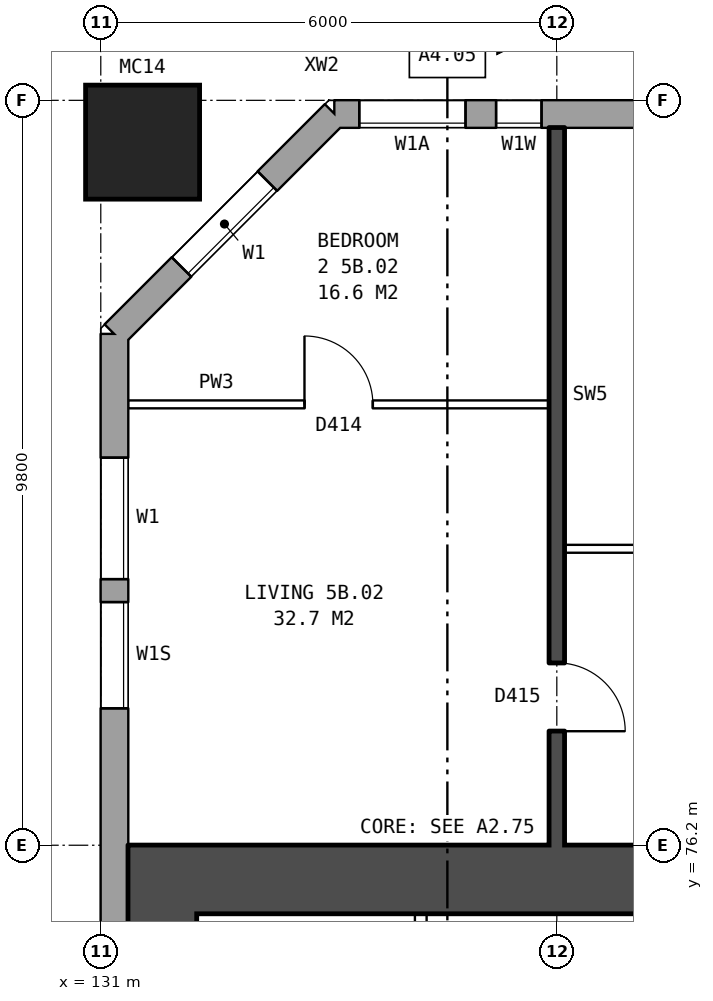
"""IFC4 building model, lengths in metres.
Left out: names, types, materials, properties, quantities, classifications, styles, units other than length and angle.
Written with IfcOpenShell. Run it as: python <this file> out.ifc"""

import sys

from ifc_helpers import new_model, si_unit, direction, frame, frame_2d, origin, origin_2d, place, context, subcontext, project, spatial, rectangle, hollow_rectangle, extrude, element, fill, save


model = new_model("IFC4")
c1 = context("Model", 3, precision=1e-05, world=origin(), true_north=direction((0.0, 1.0)))
c2 = subcontext(c1, "Body", "Model", "MODEL_VIEW")
j1 = project(units=[si_unit("LENGTHUNIT", "METRE"), si_unit("PLANEANGLEUNIT", "RADIAN")], contexts=[c1])
p1 = place(None, origin())
s1 = spatial("IfcSite", under=j1, at=p1, CompositionType="ELEMENT")
p2 = place(p1, origin())
s2 = spatial("IfcBuilding", under=s1, at=p2, CompositionType="ELEMENT")
p3 = place(p2, frame((0.0, 0.0, 22.6)))
s3 = spatial("IfcBuildingStorey", under=s2, at=p3, CompositionType="ELEMENT", Elevation=22.6)
p4 = place(p3, frame((131.55, 85.45, 0.0), z_axis=(0.0, 0.0, 1.0), x_axis=(1.0, 0.0, 0.0)))
e1 = element("IfcColumn", 1, at=p4, inside=s3, PredefinedType="COLUMN", context=c2, shape_type="SweptSolid", body=[
    extrude(hollow_rectangle(XDim=1.5, YDim=1.5, WallThickness=0.08, at=origin_2d()), origin(), (0.0, 0.0, 1.0), 3.1),
])
p5 = place(p3, frame((174.675, 85.82, 0.0), z_axis=(0.0, 0.0, 1.0), x_axis=(-1.0, 0.0, 0.0)))
e2 = element("IfcWall", 2, at=p5, inside=s3, PredefinedType="STANDARD", context=c2, shape_type="SweptSolid", body=[
    extrude(rectangle(XDim=40.601, YDim=0.36, at=frame_2d((20.3, 0.0))), origin(), (0.0, 0.0, 1.0), 2.85),
])
p6 = place(p5, frame((1.875, 0.0, 1.7)))
e3 = element("IfcOpeningElement", 3, at=p6, cuts=e2, PredefinedType="OPENING", context=c2, shape_type="SweptSolid", body=[
    extrude(rectangle(XDim=1.0, YDim=0.9, at=frame_2d((0.5, 0.45))), frame((0.0, 0.19, 0.0), z_axis=(0.0, -1.0, 0.0), x_axis=(1.0, 0.0, 0.0)), (0.0, 0.0, 1.0), 0.38),
])
p7 = place(p5, frame((5.375, 0.0, 0.8)))
e4 = element("IfcOpeningElement", 4, at=p7, cuts=e2, PredefinedType="OPENING", context=c2, shape_type="SweptSolid", body=[
    extrude(rectangle(XDim=1.6, YDim=1.8, at=frame_2d((0.8, 0.9))), frame((0.0, 0.19, 0.0), z_axis=(0.0, -1.0, 0.0), x_axis=(1.0, 0.0, 0.0)), (0.0, 0.0, 1.0), 0.38),
])
p8 = place(p5, frame((8.375, 0.0, 0.8)))
e5 = element("IfcOpeningElement", 5, at=p8, cuts=e2, PredefinedType="OPENING", context=c2, shape_type="SweptSolid", body=[
    extrude(rectangle(XDim=1.6, YDim=1.8, at=frame_2d((0.8, 0.9))), frame((0.0, 0.19, 0.0), z_axis=(0.0, -1.0, 0.0), x_axis=(1.0, 0.0, 0.0)), (0.0, 0.0, 1.0), 0.38),
])
p9 = place(p5, frame((11.375, 0.0, 0.8)))
e6 = element("IfcOpeningElement", 6, at=p9, cuts=e2, PredefinedType="OPENING", context=c2, shape_type="SweptSolid", body=[
    extrude(rectangle(XDim=1.6, YDim=1.8, at=frame_2d((0.8, 0.9))), frame((0.0, 0.19, 0.0), z_axis=(0.0, -1.0, 0.0), x_axis=(1.0, 0.0, 0.0)), (0.0, 0.0, 1.0), 0.38),
])
p10 = place(p5, frame((14.375, 0.0, 0.8)))
e7 = element("IfcOpeningElement", 7, at=p10, cuts=e2, PredefinedType="OPENING", context=c2, shape_type="SweptSolid", body=[
    extrude(rectangle(XDim=1.6, YDim=1.8, at=frame_2d((0.8, 0.9))), frame((0.0, 0.19, 0.0), z_axis=(0.0, -1.0, 0.0), x_axis=(1.0, 0.0, 0.0)), (0.0, 0.0, 1.0), 0.38),
])
p11 = place(p5, frame((17.375, 0.0, 0.8)))
e8 = element("IfcOpeningElement", 8, at=p11, cuts=e2, PredefinedType="OPENING", context=c2, shape_type="SweptSolid", body=[
    extrude(rectangle(XDim=1.6, YDim=1.8, at=frame_2d((0.8, 0.9))), frame((0.0, 0.19, 0.0), z_axis=(0.0, -1.0, 0.0), x_axis=(1.0, 0.0, 0.0)), (0.0, 0.0, 1.0), 0.38),
])
p12 = place(p5, frame((20.375, 0.0, 0.8)))
e9 = element("IfcOpeningElement", 9, at=p12, cuts=e2, PredefinedType="OPENING", context=c2, shape_type="SweptSolid", body=[
    extrude(rectangle(XDim=1.6, YDim=1.8, at=frame_2d((0.8, 0.9))), frame((0.0, 0.19, 0.0), z_axis=(0.0, -1.0, 0.0), x_axis=(1.0, 0.0, 0.0)), (0.0, 0.0, 1.0), 0.38),
])
p13 = place(p5, frame((23.375, 0.0, 0.8)))
e10 = element("IfcOpeningElement", 10, at=p13, cuts=e2, PredefinedType="OPENING", context=c2, shape_type="SweptSolid", body=[
    extrude(rectangle(XDim=1.6, YDim=1.8, at=frame_2d((0.8, 0.9))), frame((0.0, 0.19, 0.0), z_axis=(0.0, -1.0, 0.0), x_axis=(1.0, 0.0, 0.0)), (0.0, 0.0, 1.0), 0.38),
])
p14 = place(p5, frame((26.375, 0.0, 0.8)))
e11 = element("IfcOpeningElement", 11, at=p14, cuts=e2, PredefinedType="OPENING", context=c2, shape_type="SweptSolid", body=[
    extrude(rectangle(XDim=1.6, YDim=1.8, at=frame_2d((0.8, 0.9))), frame((0.0, 0.19, 0.0), z_axis=(0.0, -1.0, 0.0), x_axis=(1.0, 0.0, 0.0)), (0.0, 0.0, 1.0), 0.38),
])
p15 = place(p5, frame((29.375, 0.0, 0.8)))
e12 = element("IfcOpeningElement", 12, at=p15, cuts=e2, PredefinedType="OPENING", context=c2, shape_type="SweptSolid", body=[
    extrude(rectangle(XDim=1.6, YDim=1.8, at=frame_2d((0.8, 0.9))), frame((0.0, 0.19, 0.0), z_axis=(0.0, -1.0, 0.0), x_axis=(1.0, 0.0, 0.0)), (0.0, 0.0, 1.0), 0.38),
])
p16 = place(p5, frame((32.375, 0.0, 0.8)))
e13 = element("IfcOpeningElement", 13, at=p16, cuts=e2, PredefinedType="OPENING", context=c2, shape_type="SweptSolid", body=[
    extrude(rectangle(XDim=1.6, YDim=1.8, at=frame_2d((0.8, 0.9))), frame((0.0, 0.19, 0.0), z_axis=(0.0, -1.0, 0.0), x_axis=(1.0, 0.0, 0.0)), (0.0, 0.0, 1.0), 0.38),
])
p17 = place(p5, frame((34.275, 0.0, 0.8)))
e14 = element("IfcOpeningElement", 14, at=p17, cuts=e2, PredefinedType="OPENING", context=c2, shape_type="SweptSolid", body=[
    extrude(rectangle(XDim=1.0, YDim=1.8, at=frame_2d((0.5, 0.9))), frame((0.0, 0.19, 0.0), z_axis=(0.0, -1.0, 0.0), x_axis=(1.0, 0.0, 0.0)), (0.0, 0.0, 1.0), 0.38),
])
p18 = place(p5, frame((37.875, 0.0, 1.6)))
e15 = element("IfcOpeningElement", 15, at=p18, cuts=e2, PredefinedType="OPENING", context=c2, shape_type="SweptSolid", body=[
    extrude(rectangle(XDim=0.6, YDim=0.9, at=frame_2d((0.3, 0.45))), frame((0.0, 0.19, 0.0), z_axis=(0.0, -1.0, 0.0), x_axis=(1.0, 0.0, 0.0)), (0.0, 0.0, 1.0), 0.38),
])
p19 = place(p5, frame((4.125, 0.0, 0.8)))
e16 = element("IfcOpeningElement", 16, at=p19, cuts=e2, PredefinedType="OPENING", context=c2, shape_type="SweptSolid", body=[
    extrude(rectangle(XDim=0.8, YDim=0.9, at=frame_2d((0.4, 0.45))), frame((0.0, 0.19, 0.0), z_axis=(0.0, -1.0, 0.0), x_axis=(1.0, 0.0, 0.0)), (0.0, 0.0, 1.0), 0.38),
])
p20 = place(p5, frame((35.575, 0.0, 0.8)))
e17 = element("IfcOpeningElement", 17, at=p20, cuts=e2, PredefinedType="OPENING", context=c2, shape_type="SweptSolid", body=[
    extrude(rectangle(XDim=0.8, YDim=0.9, at=frame_2d((0.4, 0.45))), frame((0.0, 0.19, 0.0), z_axis=(0.0, -1.0, 0.0), x_axis=(1.0, 0.0, 0.0)), (0.0, 0.0, 1.0), 0.38),
])
p21 = place(p5, frame((38.875, 0.0, 0.8)))
e18 = element("IfcOpeningElement", 18, at=p21, cuts=e2, PredefinedType="OPENING", context=c2, shape_type="SweptSolid", body=[
    extrude(rectangle(XDim=1.4, YDim=1.8, at=frame_2d((0.7, 0.9))), frame((0.0, 0.19, 0.0), z_axis=(0.0, -1.0, 0.0), x_axis=(1.0, 0.0, 0.0)), (0.0, 0.0, 1.0), 0.38),
])
p22 = place(p3, frame((134.075, 85.82, 0.0), z_axis=(0.0, 0.0, 1.0), x_axis=(-0.707106781187, -0.707106781187, 0.0)))
e19 = element("IfcWall", 19, at=p22, inside=s3, PredefinedType="STANDARD", context=c2, shape_type="SweptSolid", body=[
    extrude(rectangle(XDim=4.094, YDim=0.36, at=frame_2d((2.047, 0.0))), origin(), (0.0, 0.0, 1.0), 2.85),
])
p23 = place(p22, frame((1.247, 0.0, 0.8)))
e20 = element("IfcOpeningElement", 20, at=p23, cuts=e19, PredefinedType="OPENING", context=c2, shape_type="SweptSolid", body=[
    extrude(rectangle(XDim=1.6, YDim=1.8, at=frame_2d((0.8, 0.9))), frame((0.0, 0.19, 0.0), z_axis=(0.0, -1.0, 0.0), x_axis=(1.0, 0.0, 0.0)), (0.0, 0.0, 1.0), 0.38),
])
p24 = place(p3, frame((131.18, 82.925, 0.0), z_axis=(0.0, 0.0, 1.0), x_axis=(0.0, -1.0, 0.0)))
e21 = element("IfcWall", 21, at=p24, inside=s3, PredefinedType="STANDARD", context=c2, shape_type="SweptSolid", body=[
    extrude(rectangle(XDim=25.851, YDim=0.36, at=frame_2d((12.925, 0.0))), origin(), (0.0, 0.0, 1.0), 2.85),
])
p25 = place(p24, frame((1.625, 0.0, 0.8)))
e22 = element("IfcOpeningElement", 22, at=p25, cuts=e21, PredefinedType="OPENING", context=c2, shape_type="SweptSolid", body=[
    extrude(rectangle(XDim=1.6, YDim=1.8, at=frame_2d((0.8, 0.9))), frame((0.0, 0.19, 0.0), z_axis=(0.0, -1.0, 0.0), x_axis=(1.0, 0.0, 0.0)), (0.0, 0.0, 1.0), 0.38),
])
p26 = place(p24, frame((3.525, 0.0, 1.7)))
e23 = element("IfcOpeningElement", 23, at=p26, cuts=e21, PredefinedType="OPENING", context=c2, shape_type="SweptSolid", body=[
    extrude(rectangle(XDim=1.4, YDim=0.9, at=frame_2d((0.7, 0.45))), frame((0.0, 0.19, 0.0), z_axis=(0.0, -1.0, 0.0), x_axis=(1.0, 0.0, 0.0)), (0.0, 0.0, 1.0), 0.38),
])
p27 = place(p24, frame((20.825, 0.0, 1.7)))
e24 = element("IfcOpeningElement", 24, at=p27, cuts=e21, PredefinedType="OPENING", context=c2, shape_type="SweptSolid", body=[
    extrude(rectangle(XDim=1.4, YDim=0.9, at=frame_2d((0.7, 0.45))), frame((0.0, 0.19, 0.0), z_axis=(0.0, -1.0, 0.0), x_axis=(1.0, 0.0, 0.0)), (0.0, 0.0, 1.0), 0.38),
])
p28 = place(p24, frame((22.625, 0.0, 0.8)))
e25 = element("IfcOpeningElement", 25, at=p28, cuts=e21, PredefinedType="OPENING", context=c2, shape_type="SweptSolid", body=[
    extrude(rectangle(XDim=1.6, YDim=1.8, at=frame_2d((0.8, 0.9))), frame((0.0, 0.19, 0.0), z_axis=(0.0, -1.0, 0.0), x_axis=(1.0, 0.0, 0.0)), (0.0, 0.0, 1.0), 0.38),
])
p29 = place(p3, frame((131.81, 64.7, 0.0), z_axis=(0.0, 0.0, 1.0), x_axis=(0.0, 1.0, 0.0)))
e26 = element("IfcWall", 26, at=p29, inside=s3, PredefinedType="SHEAR", context=c2, shape_type="SweptSolid", body=[
    extrude(rectangle(XDim=10.6, YDim=0.9, at=frame_2d((5.3, 0.0))), origin(), (0.0, 0.0, 1.0), 2.85),
])
p30 = place(p3, frame((139.76, 75.75, 0.0), z_axis=(0.0, 0.0, 1.0), x_axis=(-1.0, 0.0, 0.0)))
e27 = element("IfcWall", 27, at=p30, inside=s3, PredefinedType="SHEAR", context=c2, shape_type="SweptSolid", body=[
    extrude(rectangle(XDim=8.4, YDim=0.9, at=frame_2d((4.2, 0.0))), origin(), (0.0, 0.0, 1.0), 2.85),
])
p31 = place(p3, frame((135.21, 71.45, 0.0), z_axis=(0.0, 0.0, 1.0), x_axis=(0.0, 1.0, 0.0)))
e28 = element("IfcWall", 28, at=p31, inside=s3, PredefinedType="PARTITIONING", context=c2, shape_type="SweptSolid", body=[
    extrude(rectangle(XDim=3.85, YDim=0.15, at=frame_2d((1.925, 0.0))), origin(), (0.0, 0.0, 1.0), 2.85),
])
p32 = place(p31, frame((0.45, 0.0, 0.0)))
e29 = element("IfcOpeningElement", 29, at=p32, cuts=e28, PredefinedType="OPENING", context=c2, shape_type="SweptSolid", body=[
    extrude(rectangle(XDim=1.1, YDim=2.1, at=frame_2d((0.55, 1.05))), frame((0.0, 0.085, 0.0), z_axis=(0.0, -1.0, 0.0), x_axis=(1.0, 0.0, 0.0)), (0.0, 0.0, 1.0), 0.17),
])
p33 = place(p3, frame((137.1, 80.1, 0.0), z_axis=(0.0, 0.0, 1.0), x_axis=(1.0, 0.0, 0.0)))
e30 = element("IfcWall", 30, at=p33, inside=s3, PredefinedType="PARTITIONING", context=c2, shape_type="SweptSolid", body=[
    extrude(rectangle(XDim=5.8, YDim=0.1, at=frame_2d((2.9, 0.0))), origin(), (0.0, 0.0, 1.0), 2.85),
])
p34 = place(p33, frame((1.3, 0.0, 0.0)))
e31 = element("IfcOpeningElement", 31, at=p34, cuts=e30, PredefinedType="OPENING", context=c2, shape_type="SweptSolid", body=[
    extrude(rectangle(XDim=0.9, YDim=2.1, at=frame_2d((0.45, 1.05))), frame((0.0, 0.06, 0.0), z_axis=(0.0, -1.0, 0.0), x_axis=(1.0, 0.0, 0.0)), (0.0, 0.0, 1.0), 0.12),
])
p35 = place(p33, frame((4.2, 0.0, 0.0)))
e32 = element("IfcOpeningElement", 32, at=p35, cuts=e30, PredefinedType="OPENING", context=c2, shape_type="SweptSolid", body=[
    extrude(rectangle(XDim=0.9, YDim=2.1, at=frame_2d((0.45, 1.05))), frame((0.0, 0.06, 0.0), z_axis=(0.0, -1.0, 0.0), x_axis=(1.0, 0.0, 0.0)), (0.0, 0.0, 1.0), 0.12),
])
p36 = place(p3, frame((131.36, 82.0, 0.0), z_axis=(0.0, 0.0, 1.0), x_axis=(1.0, 0.0, 0.0)))
e33 = element("IfcWall", 33, at=p36, inside=s3, PredefinedType="PARTITIONING", context=c2, shape_type="SweptSolid", body=[
    extrude(rectangle(XDim=5.54, YDim=0.1, at=frame_2d((2.77, 0.0))), origin(), (0.0, 0.0, 1.0), 2.85),
])
p37 = place(p36, frame((2.32, 0.0, 0.0)))
e34 = element("IfcOpeningElement", 34, at=p37, cuts=e33, PredefinedType="OPENING", context=c2, shape_type="SweptSolid", body=[
    extrude(rectangle(XDim=0.9, YDim=2.1, at=frame_2d((0.45, 1.05))), frame((0.0, 0.06, 0.0), z_axis=(0.0, -1.0, 0.0), x_axis=(1.0, 0.0, 0.0)), (0.0, 0.0, 1.0), 0.12),
])
p38 = place(p3, frame((137.0, 76.2, 0.0), z_axis=(0.0, 0.0, 1.0), x_axis=(0.0, 1.0, 0.0)))
e35 = element("IfcWall", 35, at=p38, inside=s3, PredefinedType="SOLIDWALL", context=c2, shape_type="SweptSolid", body=[
    extrude(rectangle(XDim=9.44, YDim=0.2, at=frame_2d((4.72, 0.0))), origin(), (0.0, 0.0, 1.0), 2.85),
])
p39 = place(p38, frame((1.5, 0.0, 0.0)))
e36 = element("IfcOpeningElement", 36, at=p39, cuts=e35, PredefinedType="OPENING", context=c2, shape_type="SweptSolid", body=[
    extrude(rectangle(XDim=0.9, YDim=2.1, at=frame_2d((0.45, 1.05))), frame((0.0, 0.11, 0.0), z_axis=(0.0, -1.0, 0.0), x_axis=(1.0, 0.0, 0.0)), (0.0, 0.0, 1.0), 0.22),
])
p40 = place(p18, origin())
e37 = element("IfcWindow", 37, at=p40, inside=s3, PartitioningType="SINGLE_PANEL", PredefinedType="WINDOW", context=c2, shape_type="SweptSolid", body=[
    extrude(rectangle(XDim=0.6, YDim=0.9, at=frame_2d((0.3, 0.45))), frame((0.0, 0.15, 0.0), z_axis=(0.0, -1.0, 0.0), x_axis=(1.0, 0.0, 0.0)), (0.0, 0.0, 1.0), 0.06),
])
fill(e15, e37)
p41 = place(p23, origin())
e38 = element("IfcWindow", 38, at=p41, inside=s3, PartitioningType="SINGLE_PANEL", PredefinedType="WINDOW", context=c2, shape_type="SweptSolid", body=[
    extrude(rectangle(XDim=1.6, YDim=1.8, at=frame_2d((0.8, 0.9))), frame((0.0, 0.15, 0.0), z_axis=(0.0, -1.0, 0.0), x_axis=(1.0, 0.0, 0.0)), (0.0, 0.0, 1.0), 0.06),
])
fill(e20, e38)
p42 = place(p25, origin())
e39 = element("IfcWindow", 39, at=p42, inside=s3, PartitioningType="SINGLE_PANEL", PredefinedType="WINDOW", context=c2, shape_type="SweptSolid", body=[
    extrude(rectangle(XDim=1.6, YDim=1.8, at=frame_2d((0.8, 0.9))), frame((0.0, 0.15, 0.0), z_axis=(0.0, -1.0, 0.0), x_axis=(1.0, 0.0, 0.0)), (0.0, 0.0, 1.0), 0.06),
])
fill(e22, e39)
p43 = place(p26, origin())
e40 = element("IfcWindow", 40, at=p43, inside=s3, PartitioningType="SINGLE_PANEL", PredefinedType="WINDOW", context=c2, shape_type="SweptSolid", body=[
    extrude(rectangle(XDim=1.4, YDim=0.9, at=frame_2d((0.7, 0.45))), frame((0.0, 0.15, 0.0), z_axis=(0.0, -1.0, 0.0), x_axis=(1.0, 0.0, 0.0)), (0.0, 0.0, 1.0), 0.06),
])
fill(e23, e40)
p44 = place(p37, origin())
e41 = element("IfcDoor", 41, at=p44, inside=s3, OperationType="SINGLE_SWING_LEFT", PredefinedType="DOOR", context=c2, shape_type="SweptSolid", body=[
    extrude(rectangle(XDim=0.9, YDim=2.1, at=frame_2d((0.45, 1.05))), frame((0.0, 0.025, 0.0), z_axis=(0.0, -1.0, 0.0), x_axis=(1.0, 0.0, 0.0)), (0.0, 0.0, 1.0), 0.05),
])
fill(e34, e41)
p45 = place(p39, frame((0.9, 0.0, 0.0), z_axis=(0.0, 0.0, 1.0), x_axis=(-1.0, 0.0, 0.0)))
e42 = element("IfcDoor", 42, at=p45, inside=s3, OperationType="SINGLE_SWING_RIGHT", PredefinedType="DOOR", context=c2, shape_type="SweptSolid", body=[
    extrude(rectangle(XDim=0.9, YDim=2.1, at=frame_2d((0.45, 1.05))), frame((0.0, 0.025, 0.0), z_axis=(0.0, -1.0, 0.0), x_axis=(1.0, 0.0, 0.0)), (0.0, 0.0, 1.0), 0.05),
])
fill(e36, e42)
p46 = place(p21, origin())
e43 = element("IfcWindow", 43, at=p46, inside=s3, PartitioningType="SINGLE_PANEL", PredefinedType="WINDOW", context=c2, shape_type="SweptSolid", body=[
    extrude(rectangle(XDim=1.4, YDim=1.8, at=frame_2d((0.7, 0.9))), frame((0.0, 0.15, 0.0), z_axis=(0.0, -1.0, 0.0), x_axis=(1.0, 0.0, 0.0)), (0.0, 0.0, 1.0), 0.06),
])
fill(e18, e43)
save(model, sys.argv[1])
